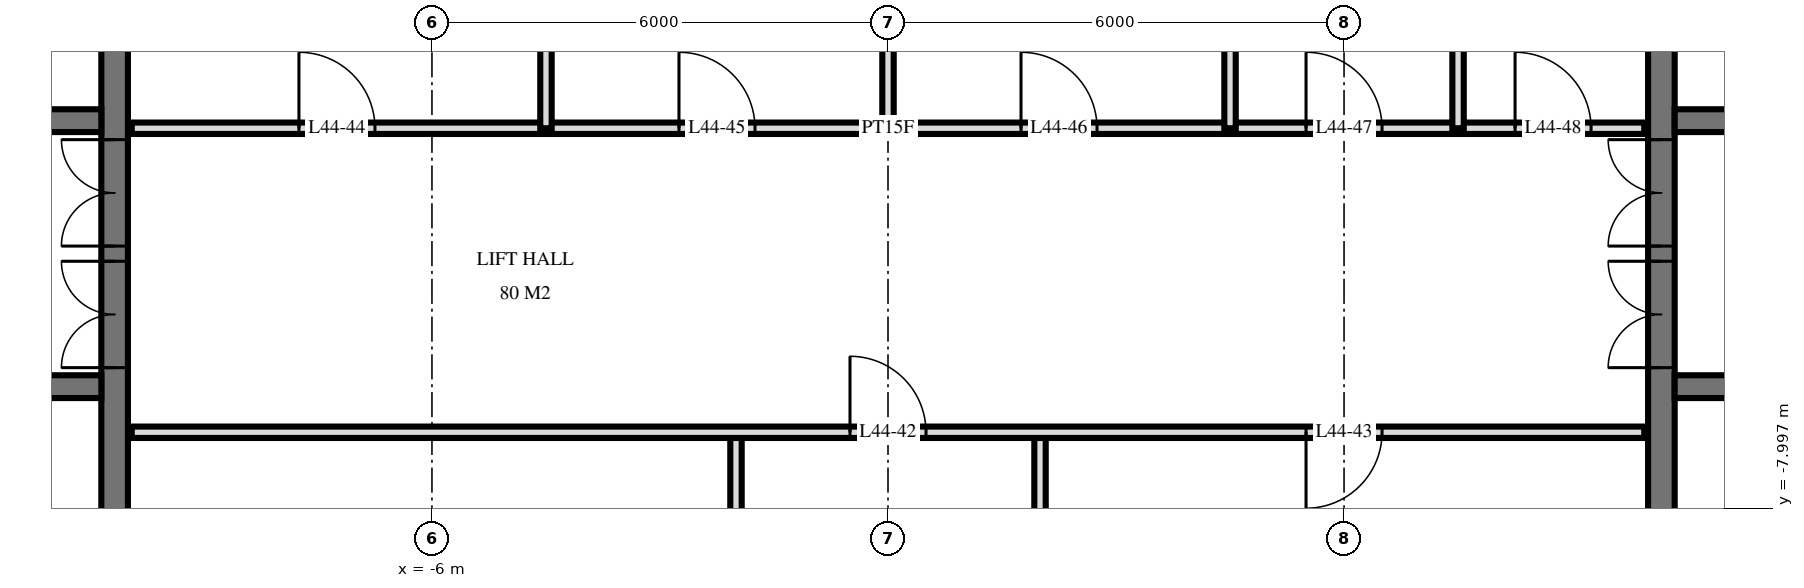
"""IFC4 building model, lengths in metres.
Left out: names, types, materials, properties, quantities, classifications, styles, units other than length and angle.
Written with IfcOpenShell. Run it as: python <this file> out.ifc"""

import sys

from ifc_helpers import new_model, si_unit, direction, frame, frame_2d, origin, place, context, subcontext, project, spatial, rectangle, extrude, element, fill, save


model = new_model("IFC4")
c1 = context("Model", 3, precision=1e-05, world=origin(), true_north=direction((0.0, 1.0)))
c2 = subcontext(c1, "Body", "Model", "MODEL_VIEW")
j1 = project(units=[si_unit("LENGTHUNIT", "METRE"), si_unit("PLANEANGLEUNIT", "RADIAN")], contexts=[c1])
p1 = place(None, origin())
s1 = spatial("IfcSite", under=j1, at=p1, CompositionType="ELEMENT")
p2 = place(p1, origin())
s2 = spatial("IfcBuilding", under=s1, at=p2, CompositionType="ELEMENT")
p3 = place(p2, frame((0.0, 0.0, 170.4)))
s3 = spatial("IfcBuildingStorey", under=s2, at=p3, CompositionType="ELEMENT", Elevation=170.4)
p4 = place(p3, frame((-10.175, -14.55, 0.0), z_axis=(0.0, 0.0, 1.0), x_axis=(0.0, 1.0, 0.0)))
e1 = element("IfcWall", 1, at=p4, inside=s3, PredefinedType="SHEAR", context=c2, shape_type="SweptSolid", body=[
    extrude(rectangle(XDim=14.1, YDim=0.35, at=frame_2d((7.05, 0.0))), origin(), (0.0, 0.0, 1.0), 3.6),
])
p5 = place(p4, frame((8.4, 0.0, 0.0)))
e2 = element("IfcOpeningElement", 2, at=p5, cuts=e1, PredefinedType="OPENING", context=c2, shape_type="SweptSolid", body=[
    extrude(rectangle(XDim=1.4, YDim=2.4, at=frame_2d((0.7, 1.2))), frame((0.0, 0.185, 0.0), z_axis=(0.0, -1.0, 0.0), x_axis=(1.0, 0.0, 0.0)), (0.0, 0.0, 1.0), 0.37),
])
p6 = place(p4, frame((10.0, 0.0, 0.0)))
e3 = element("IfcOpeningElement", 3, at=p6, cuts=e1, PredefinedType="OPENING", context=c2, shape_type="SweptSolid", body=[
    extrude(rectangle(XDim=1.4, YDim=2.4, at=frame_2d((0.7, 1.2))), frame((0.0, 0.185, 0.0), z_axis=(0.0, -1.0, 0.0), x_axis=(1.0, 0.0, 0.0)), (0.0, 0.0, 1.0), 0.37),
])
p7 = place(p4, frame((4.0, 0.0, 0.0)))
e4 = element("IfcOpeningElement", 4, at=p7, cuts=e1, PredefinedType="OPENING", context=c2, shape_type="SweptSolid", body=[
    extrude(rectangle(XDim=1.2, YDim=2.1, at=frame_2d((0.6, 1.05))), frame((0.0, 0.185, 0.0), z_axis=(0.0, -1.0, 0.0), x_axis=(1.0, 0.0, 0.0)), (0.0, 0.0, 1.0), 0.37),
])
p8 = place(p3, frame((-24.05, -2.9, 0.0), z_axis=(0.0, 0.0, 1.0), x_axis=(1.0, 0.0, 0.0)))
e5 = element("IfcWall", 5, at=p8, inside=s3, PredefinedType="SHEAR", context=c2, shape_type="SweptSolid", body=[
    extrude(rectangle(XDim=13.7, YDim=0.3, at=frame_2d((6.85, 0.0))), origin(), (0.0, 0.0, 1.0), 3.6),
])
p9 = place(p8, frame((0.55, 0.0, 0.0)))
e6 = element("IfcOpeningElement", 6, at=p9, cuts=e5, PredefinedType="OPENING", context=c2, shape_type="SweptSolid", body=[
    extrude(rectangle(XDim=1.1, YDim=2.1, at=frame_2d((0.55, 1.05))), frame((0.0, 0.16, 0.0), z_axis=(0.0, -1.0, 0.0), x_axis=(1.0, 0.0, 0.0)), (0.0, 0.0, 1.0), 0.32),
])
p10 = place(p8, frame((6.863, 0.0, 0.0)))
e7 = element("IfcOpeningElement", 7, at=p10, cuts=e5, PredefinedType="OPENING", context=c2, shape_type="SweptSolid", body=[
    extrude(rectangle(XDim=0.9, YDim=2.1, at=frame_2d((0.45, 1.05))), frame((0.0, 0.16, 0.0), z_axis=(0.0, -1.0, 0.0), x_axis=(1.0, 0.0, 0.0)), (0.0, 0.0, 1.0), 0.32),
])
p11 = place(p8, frame((5.438, 0.0, 0.0)))
e8 = element("IfcOpeningElement", 8, at=p11, cuts=e5, PredefinedType="OPENING", context=c2, shape_type="SweptSolid", body=[
    extrude(rectangle(XDim=0.9, YDim=2.1, at=frame_2d((0.45, 1.05))), frame((0.0, 0.16, 0.0), z_axis=(0.0, -1.0, 0.0), x_axis=(1.0, 0.0, 0.0)), (0.0, 0.0, 1.0), 0.32),
])
p12 = place(p8, frame((11.85, 0.0, 0.0)))
e9 = element("IfcOpeningElement", 9, at=p12, cuts=e5, PredefinedType="OPENING", context=c2, shape_type="SweptSolid", body=[
    extrude(rectangle(XDim=1.0, YDim=2.1, at=frame_2d((0.5, 1.05))), frame((0.0, 0.16, 0.0), z_axis=(0.0, -1.0, 0.0), x_axis=(1.0, 0.0, 0.0)), (0.0, 0.0, 1.0), 0.32),
])
p13 = place(p8, frame((9.562, 0.0, 0.0)))
e10 = element("IfcOpeningElement", 10, at=p13, cuts=e5, PredefinedType="OPENING", context=c2, shape_type="SweptSolid", body=[
    extrude(rectangle(XDim=1.0, YDim=2.1, at=frame_2d((0.5, 1.05))), frame((0.0, 0.16, 0.0), z_axis=(0.0, -1.0, 0.0), x_axis=(1.0, 0.0, 0.0)), (0.0, 0.0, 1.0), 0.32),
])
p14 = place(p8, frame((8.137, 0.0, 0.0)))
e11 = element("IfcOpeningElement", 11, at=p14, cuts=e5, PredefinedType="OPENING", context=c2, shape_type="SweptSolid", body=[
    extrude(rectangle(XDim=1.0, YDim=2.1, at=frame_2d((0.5, 1.05))), frame((0.0, 0.16, 0.0), z_axis=(0.0, -1.0, 0.0), x_axis=(1.0, 0.0, 0.0)), (0.0, 0.0, 1.0), 0.32),
])
p15 = place(p8, frame((3.0, 0.0, 0.0)))
e12 = element("IfcOpeningElement", 12, at=p15, cuts=e5, PredefinedType="OPENING", context=c2, shape_type="SweptSolid", body=[
    extrude(rectangle(XDim=1.0, YDim=2.1, at=frame_2d((0.5, 1.05))), frame((0.0, 0.16, 0.0), z_axis=(0.0, -1.0, 0.0), x_axis=(1.0, 0.0, 0.0)), (0.0, 0.0, 1.0), 0.32),
])
p16 = place(p3, frame((-24.05, -6.4, 0.0), z_axis=(0.0, 0.0, 1.0), x_axis=(1.0, 0.0, 0.0)))
e13 = element("IfcWall", 13, at=p16, inside=s3, PredefinedType="SHEAR", context=c2, shape_type="SweptSolid", body=[
    extrude(rectangle(XDim=13.7, YDim=0.3, at=frame_2d((6.85, 0.0))), origin(), (0.0, 0.0, 1.0), 3.6),
])
p17 = place(p16, frame((0.55, 0.0, 0.0)))
e14 = element("IfcOpeningElement", 14, at=p17, cuts=e13, PredefinedType="OPENING", context=c2, shape_type="SweptSolid", body=[
    extrude(rectangle(XDim=1.1, YDim=2.1, at=frame_2d((0.55, 1.05))), frame((0.0, 0.16, 0.0), z_axis=(0.0, -1.0, 0.0), x_axis=(1.0, 0.0, 0.0)), (0.0, 0.0, 1.0), 0.32),
])
p18 = place(p16, frame((5.8, 0.0, 0.0)))
e15 = element("IfcOpeningElement", 15, at=p18, cuts=e13, PredefinedType="OPENING", context=c2, shape_type="SweptSolid", body=[
    extrude(rectangle(XDim=1.1, YDim=2.1, at=frame_2d((0.55, 1.05))), frame((0.0, 0.16, 0.0), z_axis=(0.0, -1.0, 0.0), x_axis=(1.0, 0.0, 0.0)), (0.0, 0.0, 1.0), 0.32),
])
p19 = place(p3, frame((10.175, -14.55, 0.0), z_axis=(0.0, 0.0, 1.0), x_axis=(0.0, 1.0, 0.0)))
e16 = element("IfcWall", 16, at=p19, inside=s3, PredefinedType="SHEAR", context=c2, shape_type="SweptSolid", body=[
    extrude(rectangle(XDim=14.1, YDim=0.35, at=frame_2d((7.05, 0.0))), origin(), (0.0, 0.0, 1.0), 3.6),
])
p20 = place(p19, frame((8.4, 0.0, 0.0)))
e17 = element("IfcOpeningElement", 17, at=p20, cuts=e16, PredefinedType="OPENING", context=c2, shape_type="SweptSolid", body=[
    extrude(rectangle(XDim=1.4, YDim=2.4, at=frame_2d((0.7, 1.2))), frame((0.0, 0.185, 0.0), z_axis=(0.0, -1.0, 0.0), x_axis=(1.0, 0.0, 0.0)), (0.0, 0.0, 1.0), 0.37),
])
p21 = place(p19, frame((10.0, 0.0, 0.0)))
e18 = element("IfcOpeningElement", 18, at=p21, cuts=e16, PredefinedType="OPENING", context=c2, shape_type="SweptSolid", body=[
    extrude(rectangle(XDim=1.4, YDim=2.4, at=frame_2d((0.7, 1.2))), frame((0.0, 0.185, 0.0), z_axis=(0.0, -1.0, 0.0), x_axis=(1.0, 0.0, 0.0)), (0.0, 0.0, 1.0), 0.37),
])
p22 = place(p19, frame((4.0, 0.0, 0.0)))
e19 = element("IfcOpeningElement", 19, at=p22, cuts=e16, PredefinedType="OPENING", context=c2, shape_type="SweptSolid", body=[
    extrude(rectangle(XDim=1.2, YDim=2.1, at=frame_2d((0.6, 1.05))), frame((0.0, 0.185, 0.0), z_axis=(0.0, -1.0, 0.0), x_axis=(1.0, 0.0, 0.0)), (0.0, 0.0, 1.0), 0.37),
])
p23 = place(p3, frame((10.35, -2.9, 0.0), z_axis=(0.0, 0.0, 1.0), x_axis=(1.0, 0.0, 0.0)))
e20 = element("IfcWall", 20, at=p23, inside=s3, PredefinedType="SHEAR", context=c2, shape_type="SweptSolid", body=[
    extrude(rectangle(XDim=13.7, YDim=0.3, at=frame_2d((6.85, 0.0))), origin(), (0.0, 0.0, 1.0), 3.6),
])
p24 = place(p23, frame((12.05, 0.0, 0.0)))
e21 = element("IfcOpeningElement", 21, at=p24, cuts=e20, PredefinedType="OPENING", context=c2, shape_type="SweptSolid", body=[
    extrude(rectangle(XDim=1.1, YDim=2.1, at=frame_2d((0.55, 1.05))), frame((0.0, 0.16, 0.0), z_axis=(0.0, -1.0, 0.0), x_axis=(1.0, 0.0, 0.0)), (0.0, 0.0, 1.0), 0.32),
])
p25 = place(p23, frame((5.938, 0.0, 0.0)))
e22 = element("IfcOpeningElement", 22, at=p25, cuts=e20, PredefinedType="OPENING", context=c2, shape_type="SweptSolid", body=[
    extrude(rectangle(XDim=0.9, YDim=2.1, at=frame_2d((0.45, 1.05))), frame((0.0, 0.16, 0.0), z_axis=(0.0, -1.0, 0.0), x_axis=(1.0, 0.0, 0.0)), (0.0, 0.0, 1.0), 0.32),
])
p26 = place(p23, frame((7.363, 0.0, 0.0)))
e23 = element("IfcOpeningElement", 23, at=p26, cuts=e20, PredefinedType="OPENING", context=c2, shape_type="SweptSolid", body=[
    extrude(rectangle(XDim=0.9, YDim=2.1, at=frame_2d((0.45, 1.05))), frame((0.0, 0.16, 0.0), z_axis=(0.0, -1.0, 0.0), x_axis=(1.0, 0.0, 0.0)), (0.0, 0.0, 1.0), 0.32),
])
p27 = place(p23, frame((0.85, 0.0, 0.0)))
e24 = element("IfcOpeningElement", 24, at=p27, cuts=e20, PredefinedType="OPENING", context=c2, shape_type="SweptSolid", body=[
    extrude(rectangle(XDim=1.0, YDim=2.1, at=frame_2d((0.5, 1.05))), frame((0.0, 0.16, 0.0), z_axis=(0.0, -1.0, 0.0), x_axis=(1.0, 0.0, 0.0)), (0.0, 0.0, 1.0), 0.32),
])
p28 = place(p23, frame((3.137, 0.0, 0.0)))
e25 = element("IfcOpeningElement", 25, at=p28, cuts=e20, PredefinedType="OPENING", context=c2, shape_type="SweptSolid", body=[
    extrude(rectangle(XDim=1.0, YDim=2.1, at=frame_2d((0.5, 1.05))), frame((0.0, 0.16, 0.0), z_axis=(0.0, -1.0, 0.0), x_axis=(1.0, 0.0, 0.0)), (0.0, 0.0, 1.0), 0.32),
])
p29 = place(p23, frame((4.562, 0.0, 0.0)))
e26 = element("IfcOpeningElement", 26, at=p29, cuts=e20, PredefinedType="OPENING", context=c2, shape_type="SweptSolid", body=[
    extrude(rectangle(XDim=1.0, YDim=2.1, at=frame_2d((0.5, 1.05))), frame((0.0, 0.16, 0.0), z_axis=(0.0, -1.0, 0.0), x_axis=(1.0, 0.0, 0.0)), (0.0, 0.0, 1.0), 0.32),
])
p30 = place(p23, frame((9.7, 0.0, 0.0)))
e27 = element("IfcOpeningElement", 27, at=p30, cuts=e20, PredefinedType="OPENING", context=c2, shape_type="SweptSolid", body=[
    extrude(rectangle(XDim=1.0, YDim=2.1, at=frame_2d((0.5, 1.05))), frame((0.0, 0.16, 0.0), z_axis=(0.0, -1.0, 0.0), x_axis=(1.0, 0.0, 0.0)), (0.0, 0.0, 1.0), 0.32),
])
p31 = place(p3, frame((10.35, -6.4, 0.0), z_axis=(0.0, 0.0, 1.0), x_axis=(1.0, 0.0, 0.0)))
e28 = element("IfcWall", 28, at=p31, inside=s3, PredefinedType="SHEAR", context=c2, shape_type="SweptSolid", body=[
    extrude(rectangle(XDim=13.7, YDim=0.3, at=frame_2d((6.85, 0.0))), origin(), (0.0, 0.0, 1.0), 3.6),
])
p32 = place(p31, frame((12.05, 0.0, 0.0)))
e29 = element("IfcOpeningElement", 29, at=p32, cuts=e28, PredefinedType="OPENING", context=c2, shape_type="SweptSolid", body=[
    extrude(rectangle(XDim=1.1, YDim=2.1, at=frame_2d((0.55, 1.05))), frame((0.0, 0.16, 0.0), z_axis=(0.0, -1.0, 0.0), x_axis=(1.0, 0.0, 0.0)), (0.0, 0.0, 1.0), 0.32),
])
p33 = place(p31, frame((6.8, 0.0, 0.0)))
e30 = element("IfcOpeningElement", 30, at=p33, cuts=e28, PredefinedType="OPENING", context=c2, shape_type="SweptSolid", body=[
    extrude(rectangle(XDim=1.1, YDim=2.1, at=frame_2d((0.55, 1.05))), frame((0.0, 0.16, 0.0), z_axis=(0.0, -1.0, 0.0), x_axis=(1.0, 0.0, 0.0)), (0.0, 0.0, 1.0), 0.32),
])
for number, where, z_axis, x_axis in (
    (31, (7.5, -3.0, 0.0), (0.0, 0.0, 1.0), (0.0, 1.0, 0.0)),
    (32, (4.5, -3.0, 0.0), (0.0, 0.0, 1.0), (0.0, 1.0, 0.0)),
):
    element("IfcWall", number, at=place(p3, frame(where, z_axis=z_axis, x_axis=x_axis)), inside=s3, PredefinedType="PLUMBINGWALL", context=c2, shape_type="SweptSolid", body=[
        extrude(rectangle(XDim=4.02, YDim=0.15, at=frame_2d((2.01, 0.0))), origin(), (0.0, 0.0, 1.0), 3.32),
    ])
p34 = place(p3, frame((2.0, -11.0, 0.0), z_axis=(0.0, 0.0, 1.0), x_axis=(0.0, 1.0, 0.0)))
e33 = element("IfcWall", 33, at=p34, inside=s3, PredefinedType="PARTITIONING", context=c2, shape_type="SweptSolid", body=[
    extrude(rectangle(XDim=4.0, YDim=0.15, at=frame_2d((2.0, 0.0))), origin(), (0.0, 0.0, 1.0), 3.32),
])
p35 = place(p3, frame((0.0, -3.0, 0.0), z_axis=(0.0, 0.0, 1.0), x_axis=(0.0, 1.0, 0.0)))
e34 = element("IfcWall", 34, at=p35, inside=s3, PredefinedType="PARTITIONING", context=c2, shape_type="SweptSolid", body=[
    extrude(rectangle(XDim=4.02, YDim=0.15, at=frame_2d((2.01, 0.0))), origin(), (0.0, 0.0, 1.0), 3.32),
])
p36 = place(p3, frame((-2.0, -11.0, 0.0), z_axis=(0.0, 0.0, 1.0), x_axis=(0.0, 1.0, 0.0)))
e35 = element("IfcWall", 35, at=p36, inside=s3, PredefinedType="PARTITIONING", context=c2, shape_type="SweptSolid", body=[
    extrude(rectangle(XDim=4.0, YDim=0.15, at=frame_2d((2.0, 0.0))), origin(), (0.0, 0.0, 1.0), 3.32),
])
p37 = place(p3, frame((-4.5, -3.0, 0.0), z_axis=(0.0, 0.0, 1.0), x_axis=(0.0, 1.0, 0.0)))
e36 = element("IfcWall", 36, at=p37, inside=s3, PredefinedType="PARTITIONING", context=c2, shape_type="SweptSolid", body=[
    extrude(rectangle(XDim=4.02, YDim=0.15, at=frame_2d((2.01, 0.0))), origin(), (0.0, 0.0, 1.0), 3.32),
])
p38 = place(p3, frame((-9.95, -7.0, 0.0), z_axis=(0.0, 0.0, 1.0), x_axis=(1.0, 0.0, 0.0)))
e37 = element("IfcWall", 37, at=p38, inside=s3, PredefinedType="PARTITIONING", context=c2, shape_type="SweptSolid", body=[
    extrude(rectangle(XDim=19.9, YDim=0.15, at=frame_2d((9.95, 0.0))), origin(), (0.0, 0.0, 1.0), 3.32),
])
p39 = place(p38, frame((9.45, 0.0, 0.0)))
e38 = element("IfcOpeningElement", 38, at=p39, cuts=e37, PredefinedType="OPENING", context=c2, shape_type="SweptSolid", body=[
    extrude(rectangle(XDim=1.0, YDim=2.1, at=frame_2d((0.5, 1.05))), frame((0.0, 0.085, 0.0), z_axis=(0.0, -1.0, 0.0), x_axis=(1.0, 0.0, 0.0)), (0.0, 0.0, 1.0), 0.17),
])
p40 = place(p38, frame((15.45, 0.0, 0.0)))
e39 = element("IfcOpeningElement", 39, at=p40, cuts=e37, PredefinedType="OPENING", context=c2, shape_type="SweptSolid", body=[
    extrude(rectangle(XDim=1.0, YDim=2.1, at=frame_2d((0.5, 1.05))), frame((0.0, 0.085, 0.0), z_axis=(0.0, -1.0, 0.0), x_axis=(1.0, 0.0, 0.0)), (0.0, 0.0, 1.0), 0.17),
])
p41 = place(p3, frame((-9.95, -3.0, 0.0), z_axis=(0.0, 0.0, 1.0), x_axis=(1.0, 0.0, 0.0)))
e40 = element("IfcWall", 40, at=p41, inside=s3, PredefinedType="PARTITIONING", context=c2, shape_type="SweptSolid", body=[
    extrude(rectangle(XDim=19.9, YDim=0.15, at=frame_2d((9.95, 0.0))), origin(), (0.0, 0.0, 1.0), 3.32),
])
p42 = place(p41, frame((2.2, 0.0, 0.0)))
e41 = element("IfcOpeningElement", 41, at=p42, cuts=e40, PredefinedType="OPENING", context=c2, shape_type="SweptSolid", body=[
    extrude(rectangle(XDim=1.0, YDim=2.1, at=frame_2d((0.5, 1.05))), frame((0.0, 0.085, 0.0), z_axis=(0.0, -1.0, 0.0), x_axis=(1.0, 0.0, 0.0)), (0.0, 0.0, 1.0), 0.17),
])
p43 = place(p41, frame((7.2, 0.0, 0.0)))
e42 = element("IfcOpeningElement", 42, at=p43, cuts=e40, PredefinedType="OPENING", context=c2, shape_type="SweptSolid", body=[
    extrude(rectangle(XDim=1.0, YDim=2.1, at=frame_2d((0.5, 1.05))), frame((0.0, 0.085, 0.0), z_axis=(0.0, -1.0, 0.0), x_axis=(1.0, 0.0, 0.0)), (0.0, 0.0, 1.0), 0.17),
])
p44 = place(p41, frame((11.7, 0.0, 0.0)))
e43 = element("IfcOpeningElement", 43, at=p44, cuts=e40, PredefinedType="OPENING", context=c2, shape_type="SweptSolid", body=[
    extrude(rectangle(XDim=1.0, YDim=2.1, at=frame_2d((0.5, 1.05))), frame((0.0, 0.085, 0.0), z_axis=(0.0, -1.0, 0.0), x_axis=(1.0, 0.0, 0.0)), (0.0, 0.0, 1.0), 0.17),
])
p45 = place(p41, frame((15.45, 0.0, 0.0)))
e44 = element("IfcOpeningElement", 44, at=p45, cuts=e40, PredefinedType="OPENING", context=c2, shape_type="SweptSolid", body=[
    extrude(rectangle(XDim=1.0, YDim=2.1, at=frame_2d((0.5, 1.05))), frame((0.0, 0.085, 0.0), z_axis=(0.0, -1.0, 0.0), x_axis=(1.0, 0.0, 0.0)), (0.0, 0.0, 1.0), 0.17),
])
p46 = place(p41, frame((18.2, 0.0, 0.0)))
e45 = element("IfcOpeningElement", 45, at=p46, cuts=e40, PredefinedType="OPENING", context=c2, shape_type="SweptSolid", body=[
    extrude(rectangle(XDim=1.0, YDim=2.1, at=frame_2d((0.5, 1.05))), frame((0.0, 0.085, 0.0), z_axis=(0.0, -1.0, 0.0), x_axis=(1.0, 0.0, 0.0)), (0.0, 0.0, 1.0), 0.17),
])
p47 = place(p5, origin())
e46 = element("IfcDoor", 46, at=p47, inside=s3, OperationType="DOUBLE_DOOR_SINGLE_SWING", PredefinedType="DOOR", context=c2, shape_type="SweptSolid", body=[
    extrude(rectangle(XDim=1.4, YDim=2.4, at=frame_2d((0.7, 1.2))), frame((0.0, 0.025, 0.0), z_axis=(0.0, -1.0, 0.0), x_axis=(1.0, 0.0, 0.0)), (0.0, 0.0, 1.0), 0.05),
])
fill(e2, e46)
p48 = place(p6, origin())
e47 = element("IfcDoor", 47, at=p48, inside=s3, OperationType="DOUBLE_DOOR_SINGLE_SWING", PredefinedType="DOOR", context=c2, shape_type="SweptSolid", body=[
    extrude(rectangle(XDim=1.4, YDim=2.4, at=frame_2d((0.7, 1.2))), frame((0.0, 0.025, 0.0), z_axis=(0.0, -1.0, 0.0), x_axis=(1.0, 0.0, 0.0)), (0.0, 0.0, 1.0), 0.05),
])
fill(e3, e47)
p49 = place(p20, origin())
e48 = element("IfcDoor", 48, at=p49, inside=s3, OperationType="DOUBLE_DOOR_SINGLE_SWING", PredefinedType="DOOR", context=c2, shape_type="SweptSolid", body=[
    extrude(rectangle(XDim=1.4, YDim=2.4, at=frame_2d((0.7, 1.2))), frame((0.0, 0.025, 0.0), z_axis=(0.0, -1.0, 0.0), x_axis=(1.0, 0.0, 0.0)), (0.0, 0.0, 1.0), 0.05),
])
fill(e17, e48)
p50 = place(p21, origin())
e49 = element("IfcDoor", 49, at=p50, inside=s3, OperationType="DOUBLE_DOOR_SINGLE_SWING", PredefinedType="DOOR", context=c2, shape_type="SweptSolid", body=[
    extrude(rectangle(XDim=1.4, YDim=2.4, at=frame_2d((0.7, 1.2))), frame((0.0, 0.025, 0.0), z_axis=(0.0, -1.0, 0.0), x_axis=(1.0, 0.0, 0.0)), (0.0, 0.0, 1.0), 0.05),
])
fill(e18, e49)
p51 = place(p39, origin())
e50 = element("IfcDoor", 50, at=p51, inside=s3, OperationType="SINGLE_SWING_RIGHT", PredefinedType="DOOR", context=c2, shape_type="SweptSolid", body=[
    extrude(rectangle(XDim=1.0, YDim=2.1, at=frame_2d((0.5, 1.05))), frame((0.0, 0.025, 0.0), z_axis=(0.0, -1.0, 0.0), x_axis=(1.0, 0.0, 0.0)), (0.0, 0.0, 1.0), 0.05),
])
fill(e38, e50)
p52 = place(p40, frame((0.5, 0.0, 0.0), z_axis=(0.0, 0.0, 1.0), x_axis=(-1.0, 0.0, 0.0)))
e51 = element("IfcDoor", 51, at=p52, inside=s3, OperationType="SINGLE_SWING_LEFT", PredefinedType="DOOR", context=c2, shape_type="SweptSolid", body=[
    extrude(rectangle(XDim=1.0, YDim=2.1, at=frame_2d((0.0, 1.05))), frame((0.0, -0.025, 0.0), z_axis=(0.0, 1.0, 0.0), x_axis=(-1.0, 0.0, 0.0)), (0.0, 0.0, 1.0), 0.05),
])
fill(e39, e51)
p53 = place(p42, origin())
e52 = element("IfcDoor", 52, at=p53, inside=s3, OperationType="SINGLE_SWING_RIGHT", PredefinedType="DOOR", context=c2, shape_type="SweptSolid", body=[
    extrude(rectangle(XDim=1.0, YDim=2.1, at=frame_2d((0.5, 1.05))), frame((0.0, 0.025, 0.0), z_axis=(0.0, -1.0, 0.0), x_axis=(1.0, 0.0, 0.0)), (0.0, 0.0, 1.0), 0.05),
])
fill(e41, e52)
p54 = place(p43, origin())
e53 = element("IfcDoor", 53, at=p54, inside=s3, OperationType="SINGLE_SWING_RIGHT", PredefinedType="DOOR", context=c2, shape_type="SweptSolid", body=[
    extrude(rectangle(XDim=1.0, YDim=2.1, at=frame_2d((0.5, 1.05))), frame((0.0, 0.025, 0.0), z_axis=(0.0, -1.0, 0.0), x_axis=(1.0, 0.0, 0.0)), (0.0, 0.0, 1.0), 0.05),
])
fill(e42, e53)
p55 = place(p44, origin())
e54 = element("IfcDoor", 54, at=p55, inside=s3, OperationType="SINGLE_SWING_RIGHT", PredefinedType="DOOR", context=c2, shape_type="SweptSolid", body=[
    extrude(rectangle(XDim=1.0, YDim=2.1, at=frame_2d((0.5, 1.05))), frame((0.0, 0.025, 0.0), z_axis=(0.0, -1.0, 0.0), x_axis=(1.0, 0.0, 0.0)), (0.0, 0.0, 1.0), 0.05),
])
fill(e43, e54)
p56 = place(p45, origin())
e55 = element("IfcDoor", 55, at=p56, inside=s3, OperationType="SINGLE_SWING_RIGHT", PredefinedType="DOOR", context=c2, shape_type="SweptSolid", body=[
    extrude(rectangle(XDim=1.0, YDim=2.1, at=frame_2d((0.5, 1.05))), frame((0.0, 0.025, 0.0), z_axis=(0.0, -1.0, 0.0), x_axis=(1.0, 0.0, 0.0)), (0.0, 0.0, 1.0), 0.05),
])
fill(e44, e55)
p57 = place(p46, origin())
e56 = element("IfcDoor", 56, at=p57, inside=s3, OperationType="SINGLE_SWING_RIGHT", PredefinedType="DOOR", context=c2, shape_type="SweptSolid", body=[
    extrude(rectangle(XDim=1.0, YDim=2.1, at=frame_2d((0.5, 1.05))), frame((0.0, 0.025, 0.0), z_axis=(0.0, -1.0, 0.0), x_axis=(1.0, 0.0, 0.0)), (0.0, 0.0, 1.0), 0.05),
])
fill(e45, e56)
save(model, sys.argv[1])
